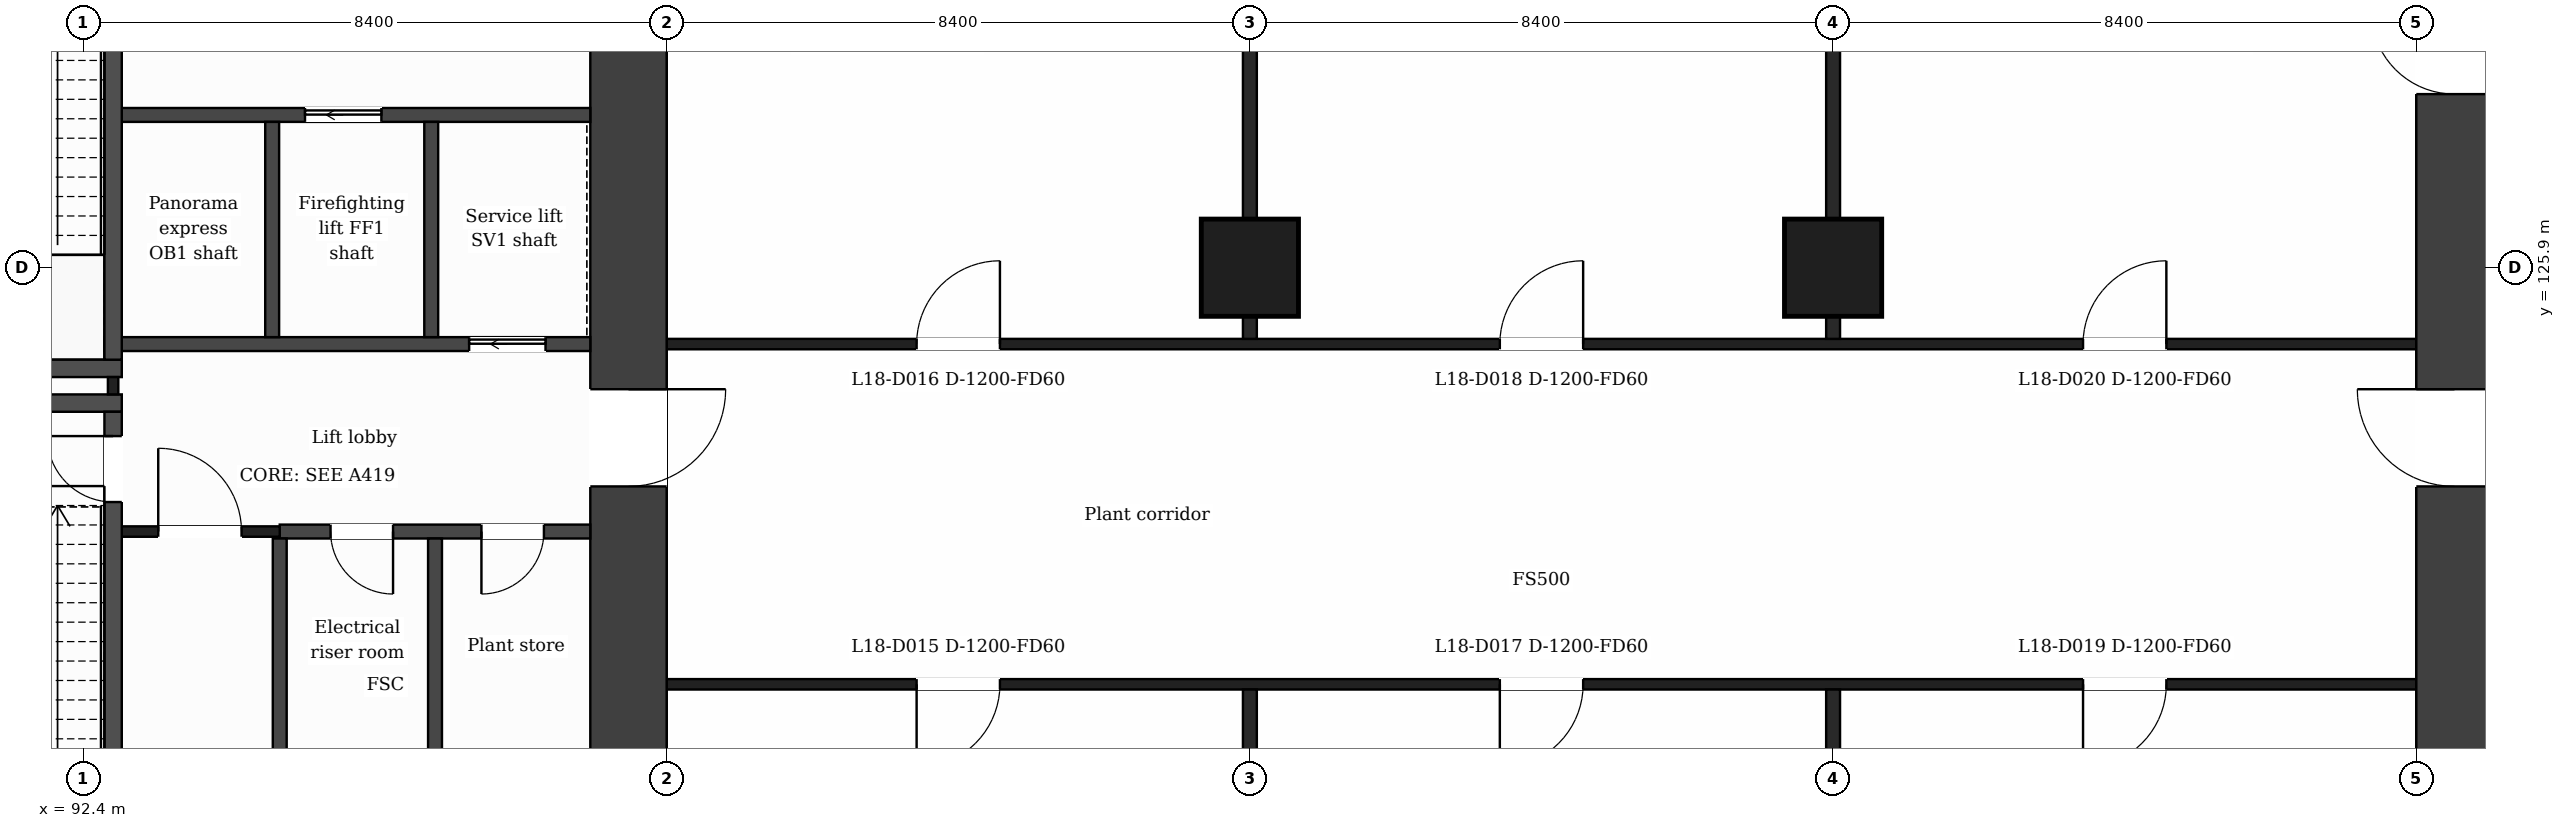
"""IFC4 building model, lengths in metres.
Left out: names, types, materials, properties, quantities, classifications, styles, units other than length and angle.
Written with IfcOpenShell. Run it as: python <this file> out.ifc"""

import sys

from ifc_helpers import new_model, si_unit, direction, frame, frame_2d, origin, origin_2d, place, context, subcontext, project, spatial, rectangle, extrude, element, fill, save


model = new_model("IFC4")
c1 = context("Model", 3, precision=1e-05, world=origin(), true_north=direction((0.0, 1.0)))
c2 = subcontext(c1, "Body", "Model", "MODEL_VIEW")
j1 = project(units=[si_unit("LENGTHUNIT", "METRE"), si_unit("PLANEANGLEUNIT", "RADIAN")], contexts=[c1])
p1 = place(None, origin())
s1 = spatial("IfcSite", under=j1, at=p1, CompositionType="ELEMENT")
p2 = place(p1, origin())
s2 = spatial("IfcBuilding", under=s1, at=p2, CompositionType="ELEMENT")
p3 = place(p2, frame((0.0, 0.0, 81.0)))
s3 = spatial("IfcBuildingStorey", under=s2, at=p3, CompositionType="ELEMENT", Elevation=81.0)
p4 = place(p3, frame((100.25, 131.85, 0.0), z_axis=(0.0, 0.0, 1.0), x_axis=(0.0, -1.0, 0.0)))
e1 = element("IfcWall", 1, at=p4, inside=s3, PredefinedType="SHEAR", context=c2, shape_type="SweptSolid", body=[
    extrude(rectangle(XDim=20.9, YDim=1.1, at=frame_2d((10.45, 0.0))), origin(), (0.0, 0.0, 1.0), 5.0),
])
p5 = place(p4, frame((18.55, 0.0, 0.0)))
e2 = element("IfcOpeningElement", 2, at=p5, cuts=e1, PredefinedType="OPENING", context=c2, shape_type="SweptSolid", body=[
    extrude(rectangle(XDim=1.2, YDim=2.1, at=frame_2d((0.6, 1.05))), frame((0.0, 0.56, 0.0), z_axis=(0.0, -1.0, 0.0), x_axis=(1.0, 0.0, 0.0)), (0.0, 0.0, 1.0), 1.12),
])
p6 = place(p4, frame((7.7, 0.0, 0.0)))
e3 = element("IfcOpeningElement", 3, at=p6, cuts=e1, PredefinedType="OPENING", context=c2, shape_type="SweptSolid", body=[
    extrude(rectangle(XDim=1.4, YDim=2.1, at=frame_2d((0.7, 1.05))), frame((0.0, 0.56, 0.0), z_axis=(0.0, -1.0, 0.0), x_axis=(1.0, 0.0, 0.0)), (0.0, 0.0, 1.0), 1.12),
])
p7 = place(p3, frame((126.55, 110.95, 0.0), z_axis=(0.0, 0.0, 1.0), x_axis=(0.0, 1.0, 0.0)))
e4 = element("IfcWall", 4, at=p7, inside=s3, PredefinedType="SHEAR", context=c2, shape_type="SweptSolid", body=[
    extrude(rectangle(XDim=20.9, YDim=1.1, at=frame_2d((10.45, 0.0))), origin(), (0.0, 0.0, 1.0), 5.0),
])
p8 = place(p7, frame((17.45, 0.0, 0.0)))
e5 = element("IfcOpeningElement", 5, at=p8, cuts=e4, PredefinedType="OPENING", context=c2, shape_type="SweptSolid", body=[
    extrude(rectangle(XDim=1.2, YDim=2.1, at=frame_2d((0.6, 1.05))), frame((0.0, 0.56, 0.0), z_axis=(0.0, -1.0, 0.0), x_axis=(1.0, 0.0, 0.0)), (0.0, 0.0, 1.0), 1.12),
])
p9 = place(p7, frame((11.8, 0.0, 0.0)))
e6 = element("IfcOpeningElement", 6, at=p9, cuts=e4, PredefinedType="OPENING", context=c2, shape_type="SweptSolid", body=[
    extrude(rectangle(XDim=1.4, YDim=2.1, at=frame_2d((0.7, 1.05))), frame((0.0, 0.56, 0.0), z_axis=(0.0, -1.0, 0.0), x_axis=(1.0, 0.0, 0.0)), (0.0, 0.0, 1.0), 1.12),
])
for number, where, z_axis, x_axis in (
    (7, (109.2, 125.9, 0.0), (0.0, 0.0, 1.0), (1.0, 0.0, 0.0)),
    (8, (117.6, 125.9, 0.0), (0.0, 0.0, 1.0), (1.0, 0.0, 0.0)),
):
    element("IfcColumn", number, at=place(p3, frame(where, z_axis=z_axis, x_axis=x_axis)), inside=s3, PredefinedType="COLUMN", context=c2, shape_type="SweptSolid", body=[
        extrude(rectangle(XDim=1.4, YDim=1.4, at=origin_2d()), origin(), (0.0, 0.0, 1.0), 5.0),
    ])
p10 = place(p3, frame((100.8, 119.9, 0.0), z_axis=(0.0, 0.0, 1.0), x_axis=(1.0, 0.0, 0.0)))
e9 = element("IfcWall", 9, at=p10, inside=s3, PredefinedType="PARTITIONING", context=c2, shape_type="SweptSolid", body=[
    extrude(rectangle(XDim=25.2, YDim=0.15, at=frame_2d((12.6, 0.0))), origin(), (0.0, 0.0, 1.0), 4.55),
])
p11 = place(p10, frame((3.6, 0.0, 0.0)))
e10 = element("IfcOpeningElement", 10, at=p11, cuts=e9, PredefinedType="OPENING", context=c2, shape_type="SweptSolid", body=[
    extrude(rectangle(XDim=1.2, YDim=2.1, at=frame_2d((0.6, 1.05))), frame((0.0, 0.085, 0.0), z_axis=(0.0, -1.0, 0.0), x_axis=(1.0, 0.0, 0.0)), (0.0, 0.0, 1.0), 0.17),
])
p12 = place(p10, frame((12.0, 0.0, 0.0)))
e11 = element("IfcOpeningElement", 11, at=p12, cuts=e9, PredefinedType="OPENING", context=c2, shape_type="SweptSolid", body=[
    extrude(rectangle(XDim=1.2, YDim=2.1, at=frame_2d((0.6, 1.05))), frame((0.0, 0.085, 0.0), z_axis=(0.0, -1.0, 0.0), x_axis=(1.0, 0.0, 0.0)), (0.0, 0.0, 1.0), 0.17),
])
p13 = place(p10, frame((20.4, 0.0, 0.0)))
e12 = element("IfcOpeningElement", 12, at=p13, cuts=e9, PredefinedType="OPENING", context=c2, shape_type="SweptSolid", body=[
    extrude(rectangle(XDim=1.2, YDim=2.1, at=frame_2d((0.6, 1.05))), frame((0.0, 0.085, 0.0), z_axis=(0.0, -1.0, 0.0), x_axis=(1.0, 0.0, 0.0)), (0.0, 0.0, 1.0), 0.17),
])
p14 = place(p3, frame((95.227, 122.1, 0.0), z_axis=(0.0, 0.0, 1.0), x_axis=(1.0, 0.0, 0.0)))
e13 = element("IfcWall", 13, at=p14, inside=s3, PredefinedType="PARTITIONING", context=c2, shape_type="SweptSolid", body=[
    extrude(rectangle(XDim=4.473, YDim=0.2, at=frame_2d((2.236, 0.0))), origin(), (0.0, 0.0, 1.0), 4.55),
])
p15 = place(p14, frame((0.732, 0.0, 0.0)))
e14 = element("IfcOpeningElement", 14, at=p15, cuts=e13, PredefinedType="OPENING", context=c2, shape_type="SweptSolid", body=[
    extrude(rectangle(XDim=0.9, YDim=2.1, at=frame_2d((0.45, 1.05))), frame((0.0, 0.11, 0.0), z_axis=(0.0, -1.0, 0.0), x_axis=(1.0, 0.0, 0.0)), (0.0, 0.0, 1.0), 0.22),
])
p16 = place(p14, frame((2.905, 0.0, 0.0)))
e15 = element("IfcOpeningElement", 15, at=p16, cuts=e13, PredefinedType="OPENING", context=c2, shape_type="SweptSolid", body=[
    extrude(rectangle(XDim=0.9, YDim=2.1, at=frame_2d((0.45, 1.05))), frame((0.0, 0.11, 0.0), z_axis=(0.0, -1.0, 0.0), x_axis=(1.0, 0.0, 0.0)), (0.0, 0.0, 1.0), 0.22),
])
p17 = place(p3, frame((92.827, 122.1, 0.0), z_axis=(0.0, 0.0, 1.0), x_axis=(1.0, 0.0, 0.0)))
e16 = element("IfcWall", 16, at=p17, inside=s3, PredefinedType="PARTITIONING", context=c2, shape_type="SweptSolid", body=[
    extrude(rectangle(XDim=2.4, YDim=0.15, at=frame_2d((1.2, 0.0))), origin(), (0.0, 0.0, 1.0), 4.55),
])
p18 = place(p17, frame((0.65, 0.0, 0.0)))
e17 = element("IfcOpeningElement", 17, at=p18, cuts=e16, PredefinedType="OPENING", context=c2, shape_type="SweptSolid", body=[
    extrude(rectangle(XDim=1.2, YDim=2.1, at=frame_2d((0.6, 1.05))), frame((0.0, 0.085, 0.0), z_axis=(0.0, -1.0, 0.0), x_axis=(1.0, 0.0, 0.0)), (0.0, 0.0, 1.0), 0.17),
])
for number, where, z_axis, x_axis in (
    (18, (89.552, 123.95, 0.0), (0.0, 0.0, 1.0), (1.0, 0.0, 0.0)),
    (19, (89.552, 124.45, 0.0), (0.0, 0.0, 1.0), (1.0, 0.0, 0.0)),
):
    element("IfcWall", number, at=place(p3, frame(where, z_axis=z_axis, x_axis=x_axis)), inside=s3, PredefinedType="PARTITIONING", context=c2, shape_type="SweptSolid", body=[
        extrude(rectangle(XDim=3.4, YDim=0.25, at=frame_2d((1.7, 0.0))), origin(), (0.0, 0.0, 1.0), 4.55),
    ])
p19 = place(p3, frame((92.702, 124.8, 0.0), z_axis=(0.0, 0.0, 1.0), x_axis=(1.0, 0.0, 0.0)))
e20 = element("IfcWall", 20, at=p19, inside=s3, PredefinedType="PARTITIONING", context=c2, shape_type="SweptSolid", body=[
    extrude(rectangle(XDim=6.998, YDim=0.2, at=frame_2d((3.499, 0.0))), origin(), (0.0, 0.0, 1.0), 4.55),
])
p20 = place(p19, frame((5.253, 0.0, 0.0)))
e21 = element("IfcOpeningElement", 21, at=p20, cuts=e20, PredefinedType="OPENING", context=c2, shape_type="SweptSolid", body=[
    extrude(rectangle(XDim=1.1, YDim=2.1, at=frame_2d((0.55, 1.05))), frame((0.0, 0.11, 0.0), z_axis=(0.0, -1.0, 0.0), x_axis=(1.0, 0.0, 0.0)), (0.0, 0.0, 1.0), 0.22),
])
p21 = place(p3, frame((100.8, 124.8, 0.0), z_axis=(0.0, 0.0, 1.0), x_axis=(1.0, 0.0, 0.0)))
e22 = element("IfcWall", 22, at=p21, inside=s3, PredefinedType="PARTITIONING", context=c2, shape_type="SweptSolid", body=[
    extrude(rectangle(XDim=25.2, YDim=0.15, at=frame_2d((12.6, 0.0))), origin(), (0.0, 0.0, 1.0), 4.55),
])
p22 = place(p21, frame((3.6, 0.0, 0.0)))
e23 = element("IfcOpeningElement", 23, at=p22, cuts=e22, PredefinedType="OPENING", context=c2, shape_type="SweptSolid", body=[
    extrude(rectangle(XDim=1.2, YDim=2.1, at=frame_2d((0.6, 1.05))), frame((0.0, 0.085, 0.0), z_axis=(0.0, -1.0, 0.0), x_axis=(1.0, 0.0, 0.0)), (0.0, 0.0, 1.0), 0.17),
])
p23 = place(p21, frame((12.0, 0.0, 0.0)))
e24 = element("IfcOpeningElement", 24, at=p23, cuts=e22, PredefinedType="OPENING", context=c2, shape_type="SweptSolid", body=[
    extrude(rectangle(XDim=1.2, YDim=2.1, at=frame_2d((0.6, 1.05))), frame((0.0, 0.085, 0.0), z_axis=(0.0, -1.0, 0.0), x_axis=(1.0, 0.0, 0.0)), (0.0, 0.0, 1.0), 0.17),
])
p24 = place(p21, frame((20.4, 0.0, 0.0)))
e25 = element("IfcOpeningElement", 25, at=p24, cuts=e22, PredefinedType="OPENING", context=c2, shape_type="SweptSolid", body=[
    extrude(rectangle(XDim=1.2, YDim=2.1, at=frame_2d((0.6, 1.05))), frame((0.0, 0.085, 0.0), z_axis=(0.0, -1.0, 0.0), x_axis=(1.0, 0.0, 0.0)), (0.0, 0.0, 1.0), 0.17),
])
p25 = place(p3, frame((92.827, 128.1, 0.0), z_axis=(0.0, 0.0, 1.0), x_axis=(1.0, 0.0, 0.0)))
e26 = element("IfcWall", 26, at=p25, inside=s3, PredefinedType="PARTITIONING", context=c2, shape_type="SweptSolid", body=[
    extrude(rectangle(XDim=6.873, YDim=0.2, at=frame_2d((3.437, 0.0))), origin(), (0.0, 0.0, 1.0), 4.55),
])
p26 = place(p25, frame((2.764, 0.0, 0.0)))
e27 = element("IfcOpeningElement", 27, at=p26, cuts=e26, PredefinedType="OPENING", context=c2, shape_type="SweptSolid", body=[
    extrude(rectangle(XDim=1.1, YDim=2.1, at=frame_2d((0.55, 1.05))), frame((0.0, 0.11, 0.0), z_axis=(0.0, -1.0, 0.0), x_axis=(1.0, 0.0, 0.0)), (0.0, 0.0, 1.0), 0.22),
])
p27 = place(p3, frame((92.827, 124.075, 0.0), z_axis=(0.0, 0.0, 1.0), x_axis=(0.0, 1.0, 0.0)))
e28 = element("IfcWall", 28, at=p27, inside=s3, PredefinedType="PARTITIONING", context=c2, shape_type="SweptSolid", body=[
    extrude(rectangle(XDim=0.25, YDim=0.15, at=frame_2d((0.125, 0.0))), origin(), (0.0, 0.0, 1.0), 4.55),
])
p28 = place(p3, frame((92.827, 117.07, 0.0), z_axis=(0.0, 0.0, 1.0), x_axis=(0.0, 1.0, 0.0)))
e29 = element("IfcWall", 29, at=p28, inside=s3, PredefinedType="PARTITIONING", context=c2, shape_type="SweptSolid", body=[
    extrude(rectangle(XDim=6.755, YDim=0.25, at=frame_2d((3.377, 0.0))), origin(), (0.0, 0.0, 1.0), 4.55),
])
p29 = place(p28, frame((5.455, 0.0, 0.0)))
e30 = element("IfcOpeningElement", 30, at=p29, cuts=e29, PredefinedType="OPENING", context=c2, shape_type="SweptSolid", body=[
    extrude(rectangle(XDim=0.95, YDim=2.1, at=frame_2d((0.475, 1.05))), frame((0.0, 0.135, 0.0), z_axis=(0.0, -1.0, 0.0), x_axis=(1.0, 0.0, 0.0)), (0.0, 0.0, 1.0), 0.27),
])
p30 = place(p3, frame((92.827, 124.575, 0.0), z_axis=(0.0, 0.0, 1.0), x_axis=(0.0, 1.0, 0.0)))
e31 = element("IfcWall", 31, at=p30, inside=s3, PredefinedType="PARTITIONING", context=c2, shape_type="SweptSolid", body=[
    extrude(rectangle(XDim=6.755, YDim=0.25, at=frame_2d((3.377, 0.0))), origin(), (0.0, 0.0, 1.0), 4.55),
])
p31 = place(p30, frame((5.325, 0.0, 0.0)))
e32 = element("IfcOpeningElement", 32, at=p31, cuts=e31, PredefinedType="OPENING", context=c2, shape_type="SweptSolid", body=[
    extrude(rectangle(XDim=1.0, YDim=2.1, at=frame_2d((0.5, 1.05))), frame((0.0, 0.135, 0.0), z_axis=(0.0, -1.0, 0.0), x_axis=(1.0, 0.0, 0.0)), (0.0, 0.0, 1.0), 0.27),
])
p32 = place(p3, frame((95.118, 124.9, 0.0), z_axis=(0.0, 0.0, 1.0), x_axis=(0.0, 1.0, 0.0)))
e33 = element("IfcWall", 33, at=p32, inside=s3, PredefinedType="PARTITIONING", context=c2, shape_type="SweptSolid", body=[
    extrude(rectangle(XDim=3.1, YDim=0.2, at=frame_2d((1.55, 0.0))), origin(), (0.0, 0.0, 1.0), 4.55),
])
p33 = place(p3, frame((95.227, 117.07, 0.0), z_axis=(0.0, 0.0, 1.0), x_axis=(0.0, 1.0, 0.0)))
e34 = element("IfcWall", 34, at=p33, inside=s3, PredefinedType="PARTITIONING", context=c2, shape_type="SweptSolid", body=[
    extrude(rectangle(XDim=4.93, YDim=0.2, at=frame_2d((2.465, 0.0))), origin(), (0.0, 0.0, 1.0), 4.55),
])
p34 = place(p33, frame((0.48, 0.0, 0.0)))
e35 = element("IfcOpeningElement", 35, at=p34, cuts=e34, PredefinedType="OPENING", context=c2, shape_type="SweptSolid", body=[
    extrude(rectangle(XDim=0.9, YDim=2.1, at=frame_2d((0.45, 1.05))), frame((0.0, 0.11, 0.0), z_axis=(0.0, -1.0, 0.0), x_axis=(1.0, 0.0, 0.0)), (0.0, 0.0, 1.0), 0.22),
])
for number, where, z_axis, x_axis in (
    (36, (97.409, 124.9, 0.0), (0.0, 0.0, 1.0), (0.0, 1.0, 0.0)),
    (37, (97.463, 118.9, 0.0), (0.0, 0.0, 1.0), (0.0, 1.0, 0.0)),
):
    element("IfcWall", number, at=place(p3, frame(where, z_axis=z_axis, x_axis=x_axis)), inside=s3, PredefinedType="PARTITIONING", context=c2, shape_type="SweptSolid", body=[
        extrude(rectangle(XDim=3.1, YDim=0.2, at=frame_2d((1.55, 0.0))), origin(), (0.0, 0.0, 1.0), 4.55),
    ])
p35 = place(p3, frame((109.2, 110.475, 0.0), z_axis=(0.0, 0.0, 1.0), x_axis=(0.0, 1.0, 0.0)))
e38 = element("IfcWall", 38, at=p35, inside=s3, PredefinedType="PARTITIONING", context=c2, shape_type="SweptSolid", body=[
    extrude(rectangle(XDim=9.35, YDim=0.2, at=frame_2d((4.675, 0.0))), origin(), (0.0, 0.0, 1.0), 4.55),
])
p36 = place(p3, frame((109.2, 124.875, 0.0), z_axis=(0.0, 0.0, 1.0), x_axis=(0.0, 1.0, 0.0)))
e39 = element("IfcWall", 39, at=p36, inside=s3, PredefinedType="PARTITIONING", context=c2, shape_type="SweptSolid", body=[
    extrude(rectangle(XDim=7.45, YDim=0.2, at=frame_2d((3.725, 0.0))), origin(), (0.0, 0.0, 1.0), 4.55),
])
p37 = place(p3, frame((117.6, 110.475, 0.0), z_axis=(0.0, 0.0, 1.0), x_axis=(0.0, 1.0, 0.0)))
e40 = element("IfcWall", 40, at=p37, inside=s3, PredefinedType="PARTITIONING", context=c2, shape_type="SweptSolid", body=[
    extrude(rectangle(XDim=9.35, YDim=0.2, at=frame_2d((4.675, 0.0))), origin(), (0.0, 0.0, 1.0), 4.55),
])
p38 = place(p3, frame((117.6, 124.875, 0.0), z_axis=(0.0, 0.0, 1.0), x_axis=(0.0, 1.0, 0.0)))
e41 = element("IfcWall", 41, at=p38, inside=s3, PredefinedType="PARTITIONING", context=c2, shape_type="SweptSolid", body=[
    extrude(rectangle(XDim=7.45, YDim=0.2, at=frame_2d((3.725, 0.0))), origin(), (0.0, 0.0, 1.0), 4.55),
])
p39 = place(p11, origin())
e42 = element("IfcDoor", 42, at=p39, inside=s3, OperationType="SINGLE_SWING_LEFT", PredefinedType="DOOR", context=c2, shape_type="SweptSolid", body=[
    extrude(rectangle(XDim=1.2, YDim=2.1, at=frame_2d((0.6, 1.05))), frame((0.0, 0.025, 0.0), z_axis=(0.0, -1.0, 0.0), x_axis=(1.0, 0.0, 0.0)), (0.0, 0.0, 1.0), 0.05),
])
fill(e10, e42)
p40 = place(p22, origin())
e43 = element("IfcDoor", 43, at=p40, inside=s3, OperationType="SINGLE_SWING_RIGHT", PredefinedType="DOOR", context=c2, shape_type="SweptSolid", body=[
    extrude(rectangle(XDim=1.2, YDim=2.1, at=frame_2d((0.6, 1.05))), frame((0.0, 0.025, 0.0), z_axis=(0.0, -1.0, 0.0), x_axis=(1.0, 0.0, 0.0)), (0.0, 0.0, 1.0), 0.05),
])
fill(e23, e43)
p41 = place(p12, origin())
e44 = element("IfcDoor", 44, at=p41, inside=s3, OperationType="SINGLE_SWING_LEFT", PredefinedType="DOOR", context=c2, shape_type="SweptSolid", body=[
    extrude(rectangle(XDim=1.2, YDim=2.1, at=frame_2d((0.6, 1.05))), frame((0.0, 0.025, 0.0), z_axis=(0.0, -1.0, 0.0), x_axis=(1.0, 0.0, 0.0)), (0.0, 0.0, 1.0), 0.05),
])
fill(e11, e44)
p42 = place(p23, origin())
e45 = element("IfcDoor", 45, at=p42, inside=s3, OperationType="SINGLE_SWING_RIGHT", PredefinedType="DOOR", context=c2, shape_type="SweptSolid", body=[
    extrude(rectangle(XDim=1.2, YDim=2.1, at=frame_2d((0.6, 1.05))), frame((0.0, 0.025, 0.0), z_axis=(0.0, -1.0, 0.0), x_axis=(1.0, 0.0, 0.0)), (0.0, 0.0, 1.0), 0.05),
])
fill(e24, e45)
p43 = place(p13, origin())
e46 = element("IfcDoor", 46, at=p43, inside=s3, OperationType="SINGLE_SWING_LEFT", PredefinedType="DOOR", context=c2, shape_type="SweptSolid", body=[
    extrude(rectangle(XDim=1.2, YDim=2.1, at=frame_2d((0.6, 1.05))), frame((0.0, 0.025, 0.0), z_axis=(0.0, -1.0, 0.0), x_axis=(1.0, 0.0, 0.0)), (0.0, 0.0, 1.0), 0.05),
])
fill(e12, e46)
p44 = place(p24, origin())
e47 = element("IfcDoor", 47, at=p44, inside=s3, OperationType="SINGLE_SWING_RIGHT", PredefinedType="DOOR", context=c2, shape_type="SweptSolid", body=[
    extrude(rectangle(XDim=1.2, YDim=2.1, at=frame_2d((0.6, 1.05))), frame((0.0, 0.025, 0.0), z_axis=(0.0, -1.0, 0.0), x_axis=(1.0, 0.0, 0.0)), (0.0, 0.0, 1.0), 0.05),
])
fill(e25, e47)
p45 = place(p18, origin())
e48 = element("IfcDoor", 48, at=p45, inside=s3, OperationType="SINGLE_SWING_LEFT", PredefinedType="DOOR", context=c2, shape_type="SweptSolid", body=[
    extrude(rectangle(XDim=1.2, YDim=2.1, at=frame_2d((0.6, 1.05))), frame((0.0, 0.025, 0.0), z_axis=(0.0, -1.0, 0.0), x_axis=(1.0, 0.0, 0.0)), (0.0, 0.0, 1.0), 0.05),
])
fill(e17, e48)
p46 = place(p26, origin())
e49 = element("IfcDoor", 49, at=p46, inside=s3, OperationType="SLIDING_TO_LEFT", PredefinedType="DOOR", context=c2, shape_type="SweptSolid", body=[
    extrude(rectangle(XDim=1.1, YDim=2.1, at=frame_2d((0.55, 1.05))), frame((0.0, 0.025, 0.0), z_axis=(0.0, -1.0, 0.0), x_axis=(1.0, 0.0, 0.0)), (0.0, 0.0, 1.0), 0.05),
])
fill(e27, e49)
p47 = place(p20, origin())
e50 = element("IfcDoor", 50, at=p47, inside=s3, OperationType="SLIDING_TO_LEFT", PredefinedType="DOOR", context=c2, shape_type="SweptSolid", body=[
    extrude(rectangle(XDim=1.1, YDim=2.1, at=frame_2d((0.55, 1.05))), frame((0.0, 0.025, 0.0), z_axis=(0.0, -1.0, 0.0), x_axis=(1.0, 0.0, 0.0)), (0.0, 0.0, 1.0), 0.05),
])
fill(e21, e50)
p48 = place(p15, origin())
e51 = element("IfcDoor", 51, at=p48, inside=s3, OperationType="SINGLE_SWING_RIGHT", PredefinedType="DOOR", context=c2, shape_type="SweptSolid", body=[
    extrude(rectangle(XDim=0.9, YDim=2.1, at=frame_2d((0.45, 1.05))), frame((0.0, 0.025, 0.0), z_axis=(0.0, -1.0, 0.0), x_axis=(1.0, 0.0, 0.0)), (0.0, 0.0, 1.0), 0.05),
])
fill(e14, e51)
p49 = place(p16, origin())
e52 = element("IfcDoor", 52, at=p49, inside=s3, OperationType="SINGLE_SWING_LEFT", PredefinedType="DOOR", context=c2, shape_type="SweptSolid", body=[
    extrude(rectangle(XDim=0.9, YDim=2.1, at=frame_2d((0.45, 1.05))), frame((0.0, 0.025, 0.0), z_axis=(0.0, -1.0, 0.0), x_axis=(1.0, 0.0, 0.0)), (0.0, 0.0, 1.0), 0.05),
])
fill(e15, e52)
p50 = place(p29, origin())
e53 = element("IfcDoor", 53, at=p50, inside=s3, OperationType="SINGLE_SWING_RIGHT", PredefinedType="DOOR", context=c2, shape_type="SweptSolid", body=[
    extrude(rectangle(XDim=0.95, YDim=2.1, at=frame_2d((0.475, 1.05))), frame((0.0, 0.025, 0.0), z_axis=(0.0, -1.0, 0.0), x_axis=(1.0, 0.0, 0.0)), (0.0, 0.0, 1.0), 0.05),
])
fill(e30, e53)
p51 = place(p8, origin())
e54 = element("IfcDoor", 54, at=p51, inside=s3, OperationType="SINGLE_SWING_RIGHT", PredefinedType="DOOR", context=c2, shape_type="SweptSolid", body=[
    extrude(rectangle(XDim=1.2, YDim=2.1, at=frame_2d((0.6, 1.05))), frame((0.0, 0.025, 0.0), z_axis=(0.0, -1.0, 0.0), x_axis=(1.0, 0.0, 0.0)), (0.0, 0.0, 1.0), 0.05),
])
fill(e5, e54)
p52 = place(p6, origin())
e55 = element("IfcDoor", 55, at=p52, inside=s3, OperationType="SINGLE_SWING_LEFT", PredefinedType="DOOR", context=c2, shape_type="SweptSolid", body=[
    extrude(rectangle(XDim=1.4, YDim=2.1, at=frame_2d((0.7, 1.05))), frame((0.0, 0.025, 0.0), z_axis=(0.0, -1.0, 0.0), x_axis=(1.0, 0.0, 0.0)), (0.0, 0.0, 1.0), 0.05),
])
fill(e3, e55)
p53 = place(p9, origin())
e56 = element("IfcDoor", 56, at=p53, inside=s3, OperationType="SINGLE_SWING_RIGHT", PredefinedType="DOOR", context=c2, shape_type="SweptSolid", body=[
    extrude(rectangle(XDim=1.4, YDim=2.1, at=frame_2d((0.7, 1.05))), frame((0.0, 0.025, 0.0), z_axis=(0.0, -1.0, 0.0), x_axis=(1.0, 0.0, 0.0)), (0.0, 0.0, 1.0), 0.05),
])
fill(e6, e56)
save(model, sys.argv[1])
